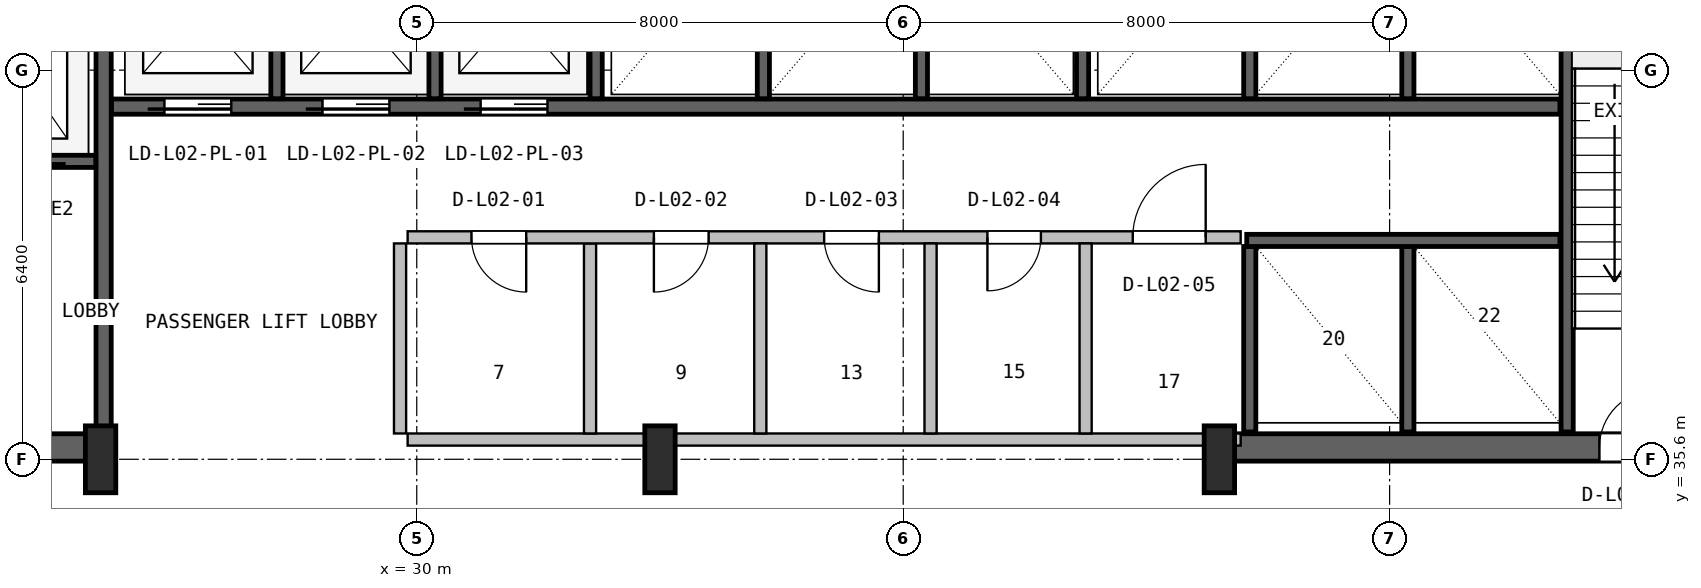
"""IFC4 building model, lengths in metres.
Left out: names, types, materials, properties, quantities, classifications, styles, units other than length and angle.
Written with IfcOpenShell. Run it as: python <this file> out.ifc"""

import sys

from ifc_helpers import new_model, si_unit, direction, frame, frame_2d, origin, origin_2d, place, context, subcontext, project, spatial, rectangle, i_section, extrude, source, transform, mapped, element, fill, save


model = new_model("IFC4")
c1 = context("Model", 3, precision=1e-05, world=origin(), true_north=direction((0.0, 1.0)))
c2 = subcontext(c1, "Body", "Model", "MODEL_VIEW")
j1 = project(units=[si_unit("LENGTHUNIT", "METRE"), si_unit("PLANEANGLEUNIT", "RADIAN")], contexts=[c1])
p1 = place(None, origin())
s1 = spatial("IfcSite", under=j1, at=p1, CompositionType="ELEMENT")
p2 = place(p1, origin())
s2 = spatial("IfcBuilding", under=s1, at=p2, CompositionType="ELEMENT")
p3 = place(p2, frame((0.0, 0.0, 11.4)))
s3 = spatial("IfcBuildingStorey", under=s2, at=p3, CompositionType="ELEMENT", Elevation=11.4)
p4 = place(p3, frame((15.57, 35.795, 0.0), z_axis=(0.0, 0.0, 1.0), x_axis=(1.0, 0.0, 0.0)))
e1 = element("IfcWall", 1, at=p4, inside=s3, PredefinedType="SHEAR", context=c2, shape_type="SweptSolid", body=[
    extrude(rectangle(XDim=9.23, YDim=0.45, at=frame_2d((4.615, 0.0))), origin(), (0.0, 0.0, 1.0), 5.12),
])
p5 = place(p4, frame((5.4, 0.0, 0.0)))
e2 = element("IfcOpeningElement", 2, at=p5, cuts=e1, PredefinedType="OPENING", context=c2, shape_type="SweptSolid", body=[
    extrude(rectangle(XDim=1.0, YDim=2.1, at=frame_2d((0.5, 1.05))), frame((0.0, 0.235, 0.0), z_axis=(0.0, -1.0, 0.0), x_axis=(1.0, 0.0, 0.0)), (0.0, 0.0, 1.0), 0.47),
])
p6 = place(p3, frame((43.2, 35.795, 0.0), z_axis=(0.0, 0.0, 1.0), x_axis=(1.0, 0.0, 0.0)))
e3 = element("IfcWall", 3, at=p6, inside=s3, PredefinedType="SHEAR", context=c2, shape_type="SweptSolid", body=[
    extrude(rectangle(XDim=9.23, YDim=0.45, at=frame_2d((4.615, 0.0))), origin(), (0.0, 0.0, 1.0), 5.12),
])
p7 = place(p6, frame((6.25, 0.0, 0.0)))
e4 = element("IfcOpeningElement", 4, at=p7, cuts=e3, PredefinedType="OPENING", context=c2, shape_type="SweptSolid", body=[
    extrude(rectangle(XDim=0.95, YDim=2.1, at=frame_2d((0.475, 1.05))), frame((0.0, 0.235, 0.0), z_axis=(0.0, -1.0, 0.0), x_axis=(1.0, 0.0, 0.0)), (0.0, 0.0, 1.0), 0.47),
])
m1 = source(origin(), c2, "Body", "SweptSolid", [
    extrude(i_section(OverallWidth=0.5, OverallDepth=1.1, WebThickness=0.018, FlangeThickness=0.032, FilletRadius=0.018, at=origin_2d()), origin(), (0.0, 0.0, 1.0), 5.4),
])
for number, where, z_axis, x_axis in (
    (5, (24.8, 35.6, 0.0), (0.0, 0.0, 1.0), (1.0, 0.0, 0.0)),
    (6, (34.0, 35.6, 0.0), (0.0, 0.0, 1.0), (1.0, 0.0, 0.0)),
    (7, (43.2, 35.6, 0.0), (0.0, 0.0, 1.0), (1.0, 0.0, 0.0)),
):
    element("IfcColumn", number, at=place(p3, frame(where, z_axis=z_axis, x_axis=x_axis)), inside=s3, PredefinedType="COLUMN", context=c2, shape_type="MappedRepresentation", body=[
        mapped(m1, transform((0.0, 0.0, 0.0), x_axis=(1.0, 0.0, 0.0), y_axis=(0.0, 1.0, 0.0), z_axis=(0.0, 0.0, 1.0), scale=1.0)),
    ])
p8 = place(p3, frame((24.85, 36.05, 0.0), z_axis=(0.0, 0.0, 1.0), x_axis=(0.0, 1.0, 0.0)))
e8 = element("IfcWall", 8, at=p8, inside=s3, PredefinedType="SHEAR", context=c2, shape_type="SweptSolid", body=[
    extrude(rectangle(XDim=10.45, YDim=0.25, at=frame_2d((5.225, 0.0))), origin(), (0.0, 0.0, 1.0), 5.12),
])
p9 = place(p3, frame((19.2, 40.5, 0.0), z_axis=(0.0, 0.0, 1.0), x_axis=(1.0, 0.0, 0.0)))
e9 = element("IfcWall", 9, at=p9, inside=s3, PredefinedType="SHEAR", context=c2, shape_type="SweptSolid", body=[
    extrude(rectangle(XDim=5.52, YDim=0.2, at=frame_2d((2.76, 0.0))), origin(), (0.0, 0.0, 1.0), 5.12),
])
p10 = place(p9, frame((1.05, 0.0, 0.0)))
e10 = element("IfcOpeningElement", 10, at=p10, cuts=e9, PredefinedType="OPENING", context=c2, shape_type="SweptSolid", body=[
    extrude(rectangle(XDim=1.1, YDim=2.18, at=frame_2d((0.55, 1.09))), frame((0.0, 0.11, 0.0), z_axis=(0.0, -1.0, 0.0), x_axis=(1.0, 0.0, 0.0)), (0.0, 0.0, 1.0), 0.22),
])
p11 = place(p9, frame((3.65, 0.0, 0.0)))
e11 = element("IfcOpeningElement", 11, at=p11, cuts=e9, PredefinedType="OPENING", context=c2, shape_type="SweptSolid", body=[
    extrude(rectangle(XDim=1.1, YDim=2.18, at=frame_2d((0.55, 1.09))), frame((0.0, 0.11, 0.0), z_axis=(0.0, -1.0, 0.0), x_axis=(1.0, 0.0, 0.0)), (0.0, 0.0, 1.0), 0.22),
])
p12 = place(p3, frame((48.92, 36.05, 0.0), z_axis=(0.0, 0.0, 1.0), x_axis=(0.0, 1.0, 0.0)))
e12 = element("IfcWall", 12, at=p12, inside=s3, PredefinedType="SHEAR", context=c2, shape_type="SweptSolid", body=[
    extrude(rectangle(XDim=10.5, YDim=0.2, at=frame_2d((5.25, 0.0))), origin(), (0.0, 0.0, 1.0), 5.12),
])
p13 = place(p3, frame((24.98, 41.4, 0.0), z_axis=(0.0, 0.0, 1.0), x_axis=(1.0, 0.0, 0.0)))
e13 = element("IfcWall", 13, at=p13, inside=s3, PredefinedType="SHEAR", context=c2, shape_type="SweptSolid", body=[
    extrude(rectangle(XDim=23.82, YDim=0.25, at=frame_2d((11.91, 0.0))), origin(), (0.0, 0.0, 1.0), 5.12),
])
p14 = place(p13, frame((0.87, 0.0, 0.0)))
e14 = element("IfcOpeningElement", 14, at=p14, cuts=e13, PredefinedType="OPENING", context=c2, shape_type="SweptSolid", body=[
    extrude(rectangle(XDim=1.1, YDim=2.18, at=frame_2d((0.55, 1.09))), frame((0.0, 0.135, 0.0), z_axis=(0.0, -1.0, 0.0), x_axis=(1.0, 0.0, 0.0)), (0.0, 0.0, 1.0), 0.27),
])
p15 = place(p13, frame((3.47, 0.0, 0.0)))
e15 = element("IfcOpeningElement", 15, at=p15, cuts=e13, PredefinedType="OPENING", context=c2, shape_type="SweptSolid", body=[
    extrude(rectangle(XDim=1.1, YDim=2.18, at=frame_2d((0.55, 1.09))), frame((0.0, 0.135, 0.0), z_axis=(0.0, -1.0, 0.0), x_axis=(1.0, 0.0, 0.0)), (0.0, 0.0, 1.0), 0.27),
])
p16 = place(p13, frame((6.07, 0.0, 0.0)))
e16 = element("IfcOpeningElement", 16, at=p16, cuts=e13, PredefinedType="OPENING", context=c2, shape_type="SweptSolid", body=[
    extrude(rectangle(XDim=1.1, YDim=2.18, at=frame_2d((0.55, 1.09))), frame((0.0, 0.135, 0.0), z_axis=(0.0, -1.0, 0.0), x_axis=(1.0, 0.0, 0.0)), (0.0, 0.0, 1.0), 0.27),
])
for number, where, z_axis, x_axis in (
    (17, (27.7, 41.53, 0.0), (0.0, 0.0, 1.0), (0.0, 1.0, 0.0)),
    (18, (30.3, 41.53, 0.0), (0.0, 0.0, 1.0), (0.0, 1.0, 0.0)),
):
    element("IfcWall", number, at=place(p3, frame(where, z_axis=z_axis, x_axis=x_axis)), inside=s3, PredefinedType="SHEAR", context=c2, shape_type="SweptSolid", body=[
        extrude(rectangle(XDim=2.87, YDim=0.2, at=frame_2d((1.435, 0.0))), origin(), (0.0, 0.0, 1.0), 5.12),
    ])
p17 = place(p3, frame((32.95, 41.53, 0.0), z_axis=(0.0, 0.0, 1.0), x_axis=(0.0, 1.0, 0.0)))
e19 = element("IfcWall", 19, at=p17, inside=s3, PredefinedType="SHEAR", context=c2, shape_type="SweptSolid", body=[
    extrude(rectangle(XDim=5.02, YDim=0.2, at=frame_2d((2.51, 0.0))), origin(), (0.0, 0.0, 1.0), 5.12),
])
for number, where, z_axis, x_axis in (
    (20, (35.7, 41.53, 0.0), (0.0, 0.0, 1.0), (0.0, 1.0, 0.0)),
    (21, (38.3, 41.53, 0.0), (0.0, 0.0, 1.0), (0.0, 1.0, 0.0)),
):
    element("IfcWall", number, at=place(p3, frame(where, z_axis=z_axis, x_axis=x_axis)), inside=s3, PredefinedType="SHEAR", context=c2, shape_type="SweptSolid", body=[
        extrude(rectangle(XDim=2.87, YDim=0.2, at=frame_2d((1.435, 0.0))), origin(), (0.0, 0.0, 1.0), 5.12),
    ])
p18 = place(p3, frame((40.95, 41.53, 0.0), z_axis=(0.0, 0.0, 1.0), x_axis=(0.0, 1.0, 0.0)))
e22 = element("IfcWall", 22, at=p18, inside=s3, PredefinedType="SHEAR", context=c2, shape_type="SweptSolid", body=[
    extrude(rectangle(XDim=5.02, YDim=0.2, at=frame_2d((2.51, 0.0))), origin(), (0.0, 0.0, 1.0), 5.12),
])
for number, where, z_axis, x_axis in (
    (23, (43.7, 41.53, 0.0), (0.0, 0.0, 1.0), (0.0, 1.0, 0.0)),
    (24, (46.3, 41.53, 0.0), (0.0, 0.0, 1.0), (0.0, 1.0, 0.0)),
):
    element("IfcWall", number, at=place(p3, frame(where, z_axis=z_axis, x_axis=x_axis)), inside=s3, PredefinedType="SHEAR", context=c2, shape_type="SweptSolid", body=[
        extrude(rectangle(XDim=2.87, YDim=0.2, at=frame_2d((1.435, 0.0))), origin(), (0.0, 0.0, 1.0), 5.12),
    ])
for number, where, z_axis, x_axis in (
    (25, (43.7, 36.05, 0.0), (0.0, 0.0, 1.0), (0.0, 1.0, 0.0)),
    (26, (46.3, 36.05, 0.0), (0.0, 0.0, 1.0), (0.0, 1.0, 0.0)),
):
    element("IfcWall", number, at=place(p3, frame(where, z_axis=z_axis, x_axis=x_axis)), inside=s3, PredefinedType="SHEAR", context=c2, shape_type="SweptSolid", body=[
        extrude(rectangle(XDim=3.05, YDim=0.2, at=frame_2d((1.525, 0.0))), origin(), (0.0, 0.0, 1.0), 5.12),
    ])
p19 = place(p3, frame((43.65, 39.2, 0.0), z_axis=(0.0, 0.0, 1.0), x_axis=(1.0, 0.0, 0.0)))
e27 = element("IfcWall", 27, at=p19, inside=s3, PredefinedType="SHEAR", context=c2, shape_type="SweptSolid", body=[
    extrude(rectangle(XDim=5.15, YDim=0.2, at=frame_2d((2.575, 0.0))), origin(), (0.0, 0.0, 1.0), 5.12),
])
p20 = place(p3, frame((29.85, 35.925, 0.0), z_axis=(0.0, 0.0, 1.0), x_axis=(1.0, 0.0, 0.0)))
e28 = element("IfcWall", 28, at=p20, inside=s3, PredefinedType="SOLIDWALL", context=c2, shape_type="SweptSolid", body=[
    extrude(rectangle(XDim=13.7, YDim=0.2, at=frame_2d((6.85, 0.0))), origin(), (0.0, 0.0, 1.0), 4.183),
])
p21 = place(p3, frame((32.85, 36.025, 0.0), z_axis=(0.0, 0.0, 1.0), x_axis=(0.0, 1.0, 0.0)))
e29 = element("IfcWall", 29, at=p21, inside=s3, PredefinedType="PLUMBINGWALL", context=c2, shape_type="SweptSolid", body=[
    extrude(rectangle(XDim=3.125, YDim=0.2, at=frame_2d((1.562, 0.0))), origin(), (0.0, 0.0, 1.0), 5.1),
])
p22 = place(p3, frame((29.85, 39.25, 0.0), z_axis=(0.0, 0.0, 1.0), x_axis=(1.0, 0.0, 0.0)))
e30 = element("IfcWall", 30, at=p22, inside=s3, PredefinedType="SOLIDWALL", context=c2, shape_type="SweptSolid", body=[
    extrude(rectangle(XDim=13.7, YDim=0.2, at=frame_2d((6.85, 0.0))), origin(), (0.0, 0.0, 1.0), 5.1),
])
p23 = place(p22, frame((1.05, 0.0, 0.0)))
e31 = element("IfcOpeningElement", 31, at=p23, cuts=e30, PredefinedType="OPENING", context=c2, shape_type="SweptSolid", body=[
    extrude(rectangle(XDim=0.9, YDim=2.06, at=frame_2d((0.45, 1.03))), frame((0.0, 0.11, 0.0), z_axis=(0.0, -1.0, 0.0), x_axis=(1.0, 0.0, 0.0)), (0.0, 0.0, 1.0), 0.22),
])
p24 = place(p22, frame((4.05, 0.0, 0.0)))
e32 = element("IfcOpeningElement", 32, at=p24, cuts=e30, PredefinedType="OPENING", context=c2, shape_type="SweptSolid", body=[
    extrude(rectangle(XDim=0.9, YDim=2.06, at=frame_2d((0.45, 1.03))), frame((0.0, 0.11, 0.0), z_axis=(0.0, -1.0, 0.0), x_axis=(1.0, 0.0, 0.0)), (0.0, 0.0, 1.0), 0.22),
])
p25 = place(p22, frame((6.85, 0.0, 0.0)))
e33 = element("IfcOpeningElement", 33, at=p25, cuts=e30, PredefinedType="OPENING", context=c2, shape_type="SweptSolid", body=[
    extrude(rectangle(XDim=0.9, YDim=2.06, at=frame_2d((0.45, 1.03))), frame((0.0, 0.11, 0.0), z_axis=(0.0, -1.0, 0.0), x_axis=(1.0, 0.0, 0.0)), (0.0, 0.0, 1.0), 0.22),
])
p26 = place(p22, frame((9.535, 0.0, 0.0)))
e34 = element("IfcOpeningElement", 34, at=p26, cuts=e30, PredefinedType="OPENING", context=c2, shape_type="SweptSolid", body=[
    extrude(rectangle(XDim=0.88, YDim=2.06, at=frame_2d((0.44, 1.03))), frame((0.0, 0.11, 0.0), z_axis=(0.0, -1.0, 0.0), x_axis=(1.0, 0.0, 0.0)), (0.0, 0.0, 1.0), 0.22),
])
p27 = place(p22, frame((11.925, 0.0, 0.0)))
e35 = element("IfcOpeningElement", 35, at=p27, cuts=e30, PredefinedType="OPENING", context=c2, shape_type="SweptSolid", body=[
    extrude(rectangle(XDim=1.2, YDim=2.1, at=frame_2d((0.6, 1.05))), frame((0.0, 0.11, 0.0), z_axis=(0.0, -1.0, 0.0), x_axis=(1.0, 0.0, 0.0)), (0.0, 0.0, 1.0), 0.22),
])
for number, where, z_axis, x_axis in (
    (36, (29.725, 36.025, 0.0), (0.0, 0.0, 1.0), (0.0, 1.0, 0.0)),
    (37, (35.65, 36.025, 0.0), (0.0, 0.0, 1.0), (0.0, 1.0, 0.0)),
    (38, (38.45, 36.025, 0.0), (0.0, 0.0, 1.0), (0.0, 1.0, 0.0)),
):
    element("IfcWall", number, at=place(p3, frame(where, z_axis=z_axis, x_axis=x_axis)), inside=s3, PredefinedType="PLUMBINGWALL", context=c2, shape_type="SweptSolid", body=[
        extrude(rectangle(XDim=3.125, YDim=0.2, at=frame_2d((1.562, 0.0))), origin(), (0.0, 0.0, 1.0), 5.1),
    ])
p28 = place(p3, frame((41.0, 36.025, 0.0), z_axis=(0.0, 0.0, 1.0), x_axis=(0.0, 1.0, 0.0)))
e39 = element("IfcWall", 39, at=p28, inside=s3, PredefinedType="SOLIDWALL", context=c2, shape_type="SweptSolid", body=[
    extrude(rectangle(XDim=3.125, YDim=0.2, at=frame_2d((1.562, 0.0))), origin(), (0.0, 0.0, 1.0), 5.1),
])
m2 = source(origin(), c2, "Body", "SweptSolid", [
    extrude(rectangle(XDim=0.95, YDim=2.1, at=frame_2d((0.475, 1.05))), frame((0.0, 0.025, 0.0), z_axis=(0.0, -1.0, 0.0), x_axis=(1.0, 0.0, 0.0)), (0.0, 0.0, 1.0), 0.05),
])
p29 = place(p7, origin())
e40 = element("IfcDoor", 40, at=p29, inside=s3, OperationType="SINGLE_SWING_RIGHT", PredefinedType="DOOR", context=c2, shape_type="MappedRepresentation", body=[
    mapped(m2, transform((0.0, 0.0, 0.0), x_axis=(1.0, 0.0, 0.0), y_axis=(0.0, 1.0, 0.0), z_axis=(0.0, 0.0, 1.0), scale=1.0)),
])
fill(e4, e40)
m3 = source(origin(), c2, "Body", "SweptSolid", [
    extrude(rectangle(XDim=1.1, YDim=2.18, at=frame_2d((0.55, 1.09))), frame((0.0, 0.025, 0.0), z_axis=(0.0, -1.0, 0.0), x_axis=(1.0, 0.0, 0.0)), (0.0, 0.0, 1.0), 0.05),
])
p30 = place(p14, frame((1.1, 0.0, 0.0), z_axis=(0.0, 0.0, 1.0), x_axis=(-1.0, 0.0, 0.0)))
e41 = element("IfcDoor", 41, at=p30, inside=s3, OperationType="SLIDING_TO_LEFT", PredefinedType="DOOR", context=c2, shape_type="MappedRepresentation", body=[
    mapped(m3, transform((0.0, 0.0, 0.0), x_axis=(1.0, 0.0, 0.0), y_axis=(0.0, 1.0, 0.0), z_axis=(0.0, 0.0, 1.0), scale=1.0)),
])
fill(e14, e41)
p31 = place(p15, frame((1.1, 0.0, 0.0), z_axis=(0.0, 0.0, 1.0), x_axis=(-1.0, 0.0, 0.0)))
e42 = element("IfcDoor", 42, at=p31, inside=s3, OperationType="SLIDING_TO_LEFT", PredefinedType="DOOR", context=c2, shape_type="MappedRepresentation", body=[
    mapped(m3, transform((0.0, 0.0, 0.0), x_axis=(1.0, 0.0, 0.0), y_axis=(0.0, 1.0, 0.0), z_axis=(0.0, 0.0, 1.0), scale=1.0)),
])
fill(e15, e42)
p32 = place(p16, frame((1.1, 0.0, 0.0), z_axis=(0.0, 0.0, 1.0), x_axis=(-1.0, 0.0, 0.0)))
e43 = element("IfcDoor", 43, at=p32, inside=s3, OperationType="SLIDING_TO_LEFT", PredefinedType="DOOR", context=c2, shape_type="MappedRepresentation", body=[
    mapped(m3, transform((0.0, 0.0, 0.0), x_axis=(1.0, 0.0, 0.0), y_axis=(0.0, 1.0, 0.0), z_axis=(0.0, 0.0, 1.0), scale=1.0)),
])
fill(e16, e43)
m4 = source(origin(), c2, "Body", "SweptSolid", [
    extrude(rectangle(XDim=0.9, YDim=2.06, at=frame_2d((0.45, 1.03))), frame((0.0, 0.025, 0.0), z_axis=(0.0, -1.0, 0.0), x_axis=(1.0, 0.0, 0.0)), (0.0, 0.0, 1.0), 0.05),
])
p33 = place(p23, frame((0.9, 0.0, 0.0), z_axis=(0.0, 0.0, 1.0), x_axis=(-1.0, 0.0, 0.0)))
e44 = element("IfcDoor", 44, at=p33, inside=s3, OperationType="SINGLE_SWING_RIGHT", PredefinedType="DOOR", context=c2, shape_type="MappedRepresentation", body=[
    mapped(m4, transform((0.0, 0.0, 0.0), x_axis=(1.0, 0.0, 0.0), y_axis=(0.0, 1.0, 0.0), z_axis=(0.0, 0.0, 1.0), scale=1.0)),
])
fill(e31, e44)
p34 = place(p24, frame((0.9, 0.0, 0.0), z_axis=(0.0, 0.0, 1.0), x_axis=(-1.0, 0.0, 0.0)))
e45 = element("IfcDoor", 45, at=p34, inside=s3, OperationType="SINGLE_SWING_LEFT", PredefinedType="DOOR", context=c2, shape_type="MappedRepresentation", body=[
    mapped(m4, transform((0.0, 0.0, 0.0), x_axis=(1.0, 0.0, 0.0), y_axis=(0.0, 1.0, 0.0), z_axis=(0.0, 0.0, 1.0), scale=1.0)),
])
fill(e32, e45)
p35 = place(p25, frame((0.9, 0.0, 0.0), z_axis=(0.0, 0.0, 1.0), x_axis=(-1.0, 0.0, 0.0)))
e46 = element("IfcDoor", 46, at=p35, inside=s3, OperationType="SINGLE_SWING_RIGHT", PredefinedType="DOOR", context=c2, shape_type="MappedRepresentation", body=[
    mapped(m4, transform((0.0, 0.0, 0.0), x_axis=(1.0, 0.0, 0.0), y_axis=(0.0, 1.0, 0.0), z_axis=(0.0, 0.0, 1.0), scale=1.0)),
])
fill(e33, e46)
m5 = source(origin(), c2, "Body", "SweptSolid", [
    extrude(rectangle(XDim=0.88, YDim=2.06, at=frame_2d((0.44, 1.03))), frame((0.0, 0.025, 0.0), z_axis=(0.0, -1.0, 0.0), x_axis=(1.0, 0.0, 0.0)), (0.0, 0.0, 1.0), 0.05),
])
p36 = place(p26, frame((0.88, 0.0, 0.0), z_axis=(0.0, 0.0, 1.0), x_axis=(-1.0, 0.0, 0.0)))
e47 = element("IfcDoor", 47, at=p36, inside=s3, OperationType="SINGLE_SWING_LEFT", PredefinedType="DOOR", context=c2, shape_type="MappedRepresentation", body=[
    mapped(m5, transform((0.0, 0.0, 0.0), x_axis=(1.0, 0.0, 0.0), y_axis=(0.0, 1.0, 0.0), z_axis=(0.0, 0.0, 1.0), scale=1.0)),
])
fill(e34, e47)
m6 = source(origin(), c2, "Body", "SweptSolid", [
    extrude(rectangle(XDim=1.2, YDim=2.1, at=frame_2d((0.6, 1.05))), frame((0.0, 0.025, 0.0), z_axis=(0.0, -1.0, 0.0), x_axis=(1.0, 0.0, 0.0)), (0.0, 0.0, 1.0), 0.05),
])
p37 = place(p27, origin())
e48 = element("IfcDoor", 48, at=p37, inside=s3, OperationType="SINGLE_SWING_RIGHT", PredefinedType="DOOR", context=c2, shape_type="MappedRepresentation", body=[
    mapped(m6, transform((0.0, 0.0, 0.0), x_axis=(1.0, 0.0, 0.0), y_axis=(0.0, 1.0, 0.0), z_axis=(0.0, 0.0, 1.0), scale=1.0)),
])
fill(e35, e48)
save(model, sys.argv[1])
